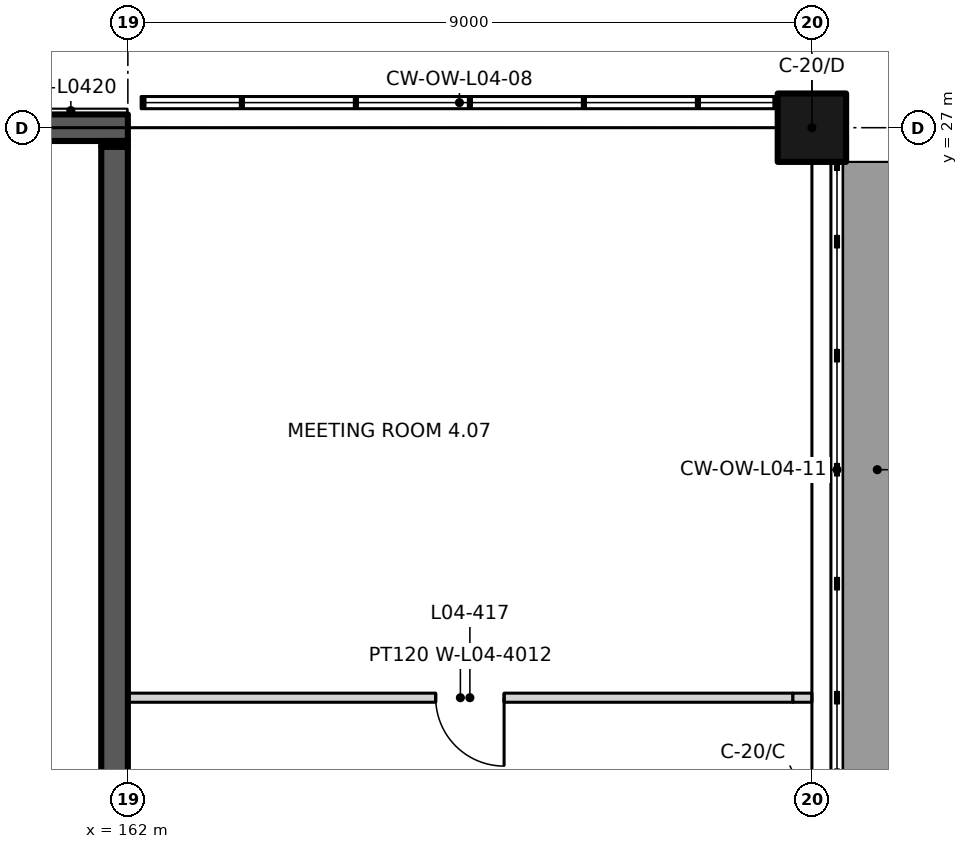
"""IFC4 building model, lengths in metres.
Left out: names, types, materials, properties, quantities, classifications, styles, units other than length and angle.
Written with IfcOpenShell. Run it as: python <this file> out.ifc"""

import sys

from ifc_helpers import new_model, si_unit, direction, frame, frame_2d, origin, origin_2d, place, context, subcontext, project, spatial, rectangle, extrude, element, fill, save


model = new_model("IFC4")
c1 = context("Model", 3, precision=1e-05, world=origin(), true_north=direction((0.0, 1.0)))
c2 = subcontext(c1, "Body", "Model", "MODEL_VIEW")
j1 = project(units=[si_unit("LENGTHUNIT", "METRE"), si_unit("PLANEANGLEUNIT", "RADIAN")], contexts=[c1])
p1 = place(None, origin())
s1 = spatial("IfcSite", under=j1, at=p1, CompositionType="ELEMENT")
p2 = place(p1, origin())
s2 = spatial("IfcBuilding", under=s1, at=p2, CompositionType="ELEMENT")
p3 = place(p2, frame((0.0, 0.0, 19.5)))
s3 = spatial("IfcBuildingStorey", under=s2, at=p3, CompositionType="ELEMENT", Elevation=19.5)
p4 = place(p3, frame((171.0, 27.0, 0.0), z_axis=(0.0, 0.0, 1.0), x_axis=(1.0, 0.0, 0.0)))
e1 = element("IfcColumn", 1, at=p4, inside=s3, PredefinedType="COLUMN", context=c2, shape_type="SweptSolid", body=[
    extrude(rectangle(XDim=0.9, YDim=0.9, at=origin_2d()), origin(), (0.0, 0.0, 1.0), 4.5),
])
p5 = place(p3, frame((144.0, 27.0, 0.0), z_axis=(0.0, 0.0, 1.0), x_axis=(1.0, 0.0, 0.0)))
e2 = element("IfcWall", 2, at=p5, inside=s3, PredefinedType="SOLIDWALL", context=c2, shape_type="SweptSolid", body=[
    extrude(rectangle(XDim=18.0, YDim=0.35, at=frame_2d((9.0, 0.0))), origin(), (0.0, 0.0, 1.0), 3.6),
])
p6 = place(p5, frame((4.2, 0.0, 0.6)))
e3 = element("IfcOpeningElement", 3, at=p6, cuts=e2, PredefinedType="OPENING", context=c2, shape_type="SweptSolid", body=[
    extrude(rectangle(XDim=0.6, YDim=2.4, at=frame_2d((0.3, 1.2))), frame((0.0, 0.185, 0.0), z_axis=(0.0, -1.0, 0.0), x_axis=(1.0, 0.0, 0.0)), (0.0, 0.0, 1.0), 0.37),
])
p7 = place(p5, frame((13.2, 0.0, 0.6)))
e4 = element("IfcOpeningElement", 4, at=p7, cuts=e2, PredefinedType="OPENING", context=c2, shape_type="SweptSolid", body=[
    extrude(rectangle(XDim=0.6, YDim=2.4, at=frame_2d((0.3, 1.2))), frame((0.0, 0.185, 0.0), z_axis=(0.0, -1.0, 0.0), x_axis=(1.0, 0.0, 0.0)), (0.0, 0.0, 1.0), 0.37),
])
p8 = place(p3, frame((162.0, 19.5, 0.0), z_axis=(0.0, 0.0, 1.0), x_axis=(1.0, 0.0, 0.0)))
e5 = element("IfcWall", 5, at=p8, inside=s3, PredefinedType="PARTITIONING", context=c2, shape_type="SweptSolid", body=[
    extrude(rectangle(XDim=8.75, YDim=0.12, at=frame_2d((4.375, 0.0))), origin(), (0.0, 0.0, 1.0), 4.2),
])
p9 = place(p8, frame((4.95, 0.0, 0.0), z_axis=(0.0, 0.0, 1.0), x_axis=(-1.0, 0.0, 0.0)))
e6 = element("IfcOpeningElement", 6, at=p9, cuts=e5, PredefinedType="OPENING", context=c2, shape_type="SweptSolid", body=[
    extrude(rectangle(XDim=0.9, YDim=2.1, at=frame_2d((0.45, 1.05))), frame((0.0, 0.07, 0.0), z_axis=(0.0, -1.0, 0.0), x_axis=(1.0, 0.0, 0.0)), (0.0, 0.0, 1.0), 0.14),
])
p10 = place(p3, frame((170.75, 19.5, 0.0), z_axis=(0.0, 0.0, 1.0), x_axis=(1.0, 0.0, 0.0)))
e7 = element("IfcWall", 7, at=p10, inside=s3, PredefinedType="PARTITIONING", context=c2, shape_type="SweptSolid", body=[
    extrude(rectangle(XDim=0.25, YDim=0.12, at=frame_2d((0.125, 0.0))), origin(), (0.0, 0.0, 1.0), 3.6),
])
p11 = place(p3, frame((161.825, 9.35, 0.0), z_axis=(0.0, 0.0, 1.0), x_axis=(0.0, 1.0, 0.0)))
e8 = element("IfcWall", 8, at=p11, inside=s3, PredefinedType="SHEAR", context=c2, shape_type="SweptSolid", body=[
    extrude(rectangle(XDim=17.4, YDim=0.35, at=frame_2d((8.7, 0.0))), origin(), (0.0, 0.0, 1.0), 4.2),
])
p12 = place(p11, frame((7.3, 0.0, 0.0), z_axis=(0.0, 0.0, 1.0), x_axis=(-1.0, 0.0, 0.0)))
e9 = element("IfcOpeningElement", 9, at=p12, cuts=e8, PredefinedType="OPENING", context=c2, shape_type="SweptSolid", body=[
    extrude(rectangle(XDim=1.8, YDim=2.4, at=frame_2d((0.9, 1.2))), frame((0.0, 0.185, 0.0), z_axis=(0.0, -1.0, 0.0), x_axis=(1.0, 0.0, 0.0)), (0.0, 0.0, 1.0), 0.37),
])
p13 = place(p3, frame((161.825, 26.75, 0.0), z_axis=(0.0, 0.0, 1.0), x_axis=(0.0, 1.0, 0.0)))
e10 = element("IfcWall", 10, at=p13, inside=s3, PredefinedType="SHEAR", context=c2, shape_type="SweptSolid", body=[
    extrude(rectangle(XDim=0.075, YDim=0.35, at=frame_2d((0.038, 0.0))), origin(), (0.0, 0.0, 1.0), 3.6),
])
p14 = place(p9, origin())
e11 = element("IfcDoor", 11, at=p14, inside=s3, OperationType="SINGLE_SWING_LEFT", PredefinedType="DOOR", context=c2, shape_type="SweptSolid", body=[
    extrude(rectangle(XDim=0.9, YDim=2.1, at=frame_2d((0.45, 1.05))), frame((0.0, 0.025, 0.0), z_axis=(0.0, -1.0, 0.0), x_axis=(1.0, 0.0, 0.0)), (0.0, 0.0, 1.0), 0.05),
])
fill(e6, e11)
save(model, sys.argv[1])
